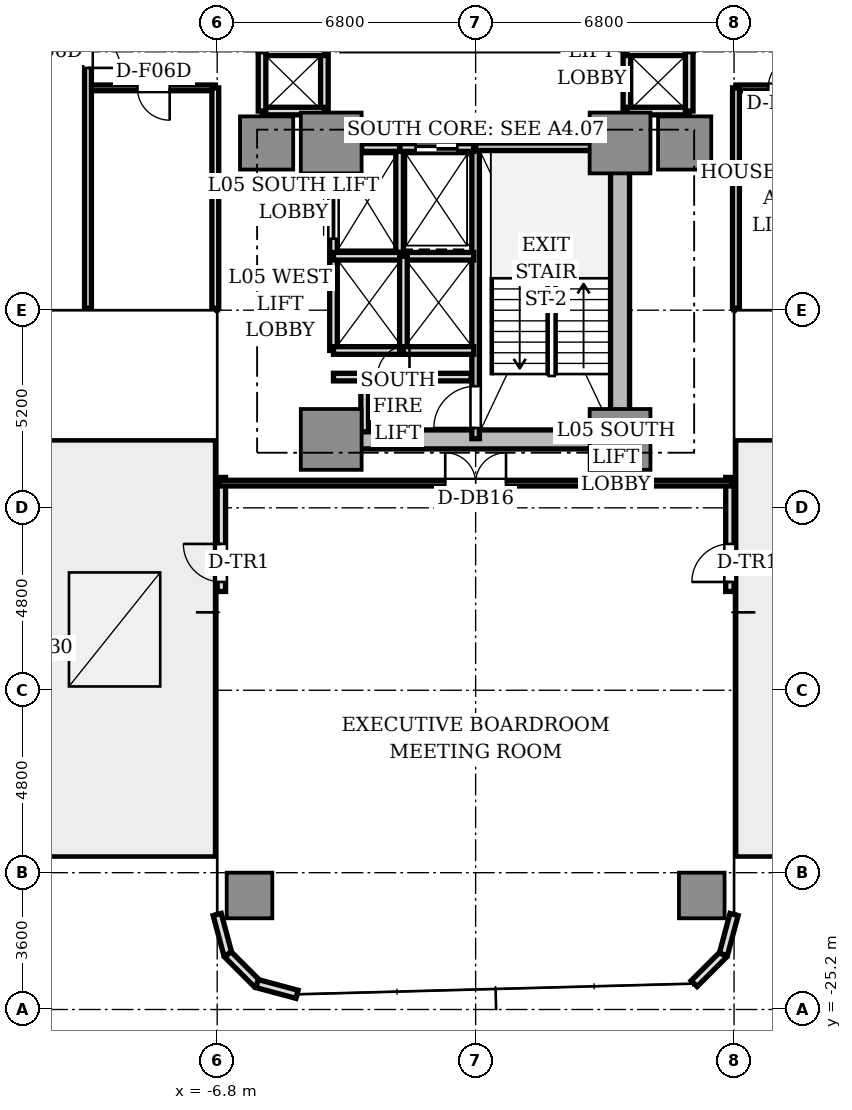
"""IFC4 building model, lengths in metres.
Left out: names, types, materials, properties, quantities, classifications, styles, units other than length and angle.
Written with IfcOpenShell. Run it as: python <this file> out.ifc"""

import sys

from ifc_helpers import new_model, si_unit, direction, frame, frame_2d, origin, origin_2d, place, context, subcontext, project, spatial, rectangle, extrude, source, transform, mapped, element, fill, save


model = new_model("IFC4")
c1 = context("Model", 3, precision=1e-05, world=origin(), true_north=direction((0.0, 1.0)))
c2 = subcontext(c1, "Body", "Model", "MODEL_VIEW")
j1 = project(units=[si_unit("LENGTHUNIT", "METRE"), si_unit("PLANEANGLEUNIT", "RADIAN")], contexts=[c1])
p1 = place(None, origin())
s1 = spatial("IfcSite", under=j1, at=p1, CompositionType="ELEMENT")
p2 = place(p1, origin())
s2 = spatial("IfcBuilding", under=s1, at=p2, CompositionType="ELEMENT")
p3 = place(p2, frame((0.0, 0.0, 23.1)))
s3 = spatial("IfcBuildingStorey", under=s2, at=p3, CompositionType="ELEMENT", Elevation=23.1)
p4 = place(p3, frame((-3.55, -10.2, 0.0), z_axis=(0.0, 0.0, 1.0), x_axis=(1.0, 0.0, 0.0)))
e1 = element("IfcWall", 1, at=p4, inside=s3, PredefinedType="SHEAR", context=c2, shape_type="SweptSolid", body=[
    extrude(rectangle(XDim=7.1, YDim=0.5, at=frame_2d((3.55, 0.0))), origin(), (0.0, 0.0, 1.0), 3.11),
])
p5 = place(p3, frame((3.8, -9.75, 0.0), z_axis=(0.0, 0.0, 1.0), x_axis=(0.0, 1.0, 0.0)))
e2 = element("IfcWall", 2, at=p5, inside=s3, PredefinedType="SHEAR", context=c2, shape_type="SweptSolid", body=[
    extrude(rectangle(XDim=6.9, YDim=0.5, at=frame_2d((3.45, 0.0))), origin(), (0.0, 0.0, 1.0), 3.11),
])
m1 = source(origin(), c2, "Body", "SweptSolid", [
    extrude(rectangle(XDim=1.6, YDim=1.6, at=origin_2d()), origin(), (0.0, 0.0, 1.0), 3.11),
])
for number, where, z_axis, x_axis in (
    (3, (-3.8, -2.4, 0.0), (0.0, 0.0, 1.0), (1.0, 0.0, 0.0)),
    (4, (3.8, -2.4, 0.0), (0.0, 0.0, 1.0), (1.0, 0.0, 0.0)),
    (5, (-3.8, -10.2, 0.0), (0.0, 0.0, 1.0), (1.0, 0.0, 0.0)),
    (6, (3.8, -10.2, 0.0), (0.0, 0.0, 1.0), (1.0, 0.0, 0.0)),
):
    element("IfcColumn", number, at=place(p3, frame(where, z_axis=z_axis, x_axis=x_axis)), inside=s3, PredefinedType="COLUMN", context=c2, shape_type="MappedRepresentation", body=[
        mapped(m1, transform((0.0, 0.0, 0.0), scale=1.0)),
    ])
m2 = source(origin(), c2, "Body", "SweptSolid", [
    extrude(rectangle(XDim=1.4, YDim=1.4, at=origin_2d()), origin(), (0.0, 0.0, 1.0), 3.11),
])
for number, where, z_axis, x_axis in (
    (7, (5.5, -2.4, 0.0), (0.0, 0.0, 1.0), (1.0, 0.0, 0.0)),
    (8, (-5.5, -2.4, 0.0), (0.0, 0.0, 1.0), (1.0, 0.0, 0.0)),
):
    element("IfcColumn", number, at=place(p3, frame(where, z_axis=z_axis, x_axis=x_axis)), inside=s3, PredefinedType="COLUMN", context=c2, shape_type="MappedRepresentation", body=[
        mapped(m2, transform((0.0, 0.0, 0.0), scale=1.0)),
    ])
m3 = source(origin(), c2, "Body", "SweptSolid", [
    extrude(rectangle(XDim=1.2, YDim=1.2, at=origin_2d()), origin(), (0.0, 0.0, 1.0), 3.11),
])
for number, where, z_axis, x_axis in (
    (9, (-5.95, -22.2, 0.0), (0.0, 0.0, 1.0), (1.0, 0.0, 0.0)),
    (10, (5.95, -22.2, 0.0), (0.0, 0.0, 1.0), (1.0, 0.0, 0.0)),
):
    element("IfcColumn", number, at=place(p3, frame(where, z_axis=z_axis, x_axis=x_axis)), inside=s3, PredefinedType="COLUMN", context=c2, shape_type="MappedRepresentation", body=[
        mapped(m3, transform((0.0, 0.0, 0.0), scale=1.0)),
    ])
p6 = place(p3, frame((-6.69, -14.2, 0.0), z_axis=(0.0, 0.0, 1.0), x_axis=(0.0, 1.0, 0.0)))
e11 = element("IfcWall", 11, at=p6, inside=s3, PredefinedType="STANDARD", context=c2, shape_type="SweptSolid", body=[
    extrude(rectangle(XDim=3.0, YDim=0.22, at=frame_2d((1.5, 0.0))), origin(), (0.0, 0.0, 1.0), 3.11),
])
p7 = place(p6, frame((0.25, 0.0, 0.0)))
e12 = element("IfcOpeningElement", 12, at=p7, cuts=e11, PredefinedType="OPENING", context=c2, shape_type="SweptSolid", body=[
    extrude(rectangle(XDim=1.0, YDim=2.2, at=frame_2d((0.5, 1.1))), frame((0.0, 0.12, 0.0), z_axis=(0.0, -1.0, 0.0), x_axis=(1.0, 0.0, 0.0)), (0.0, 0.0, 1.0), 0.24),
])
p8 = place(p3, frame((6.69, -14.2, 0.0), z_axis=(0.0, 0.0, 1.0), x_axis=(0.0, 1.0, 0.0)))
e13 = element("IfcWall", 13, at=p8, inside=s3, PredefinedType="STANDARD", context=c2, shape_type="SweptSolid", body=[
    extrude(rectangle(XDim=3.0, YDim=0.22, at=frame_2d((1.5, 0.0))), origin(), (0.0, 0.0, 1.0), 3.11),
])
p9 = place(p8, frame((0.25, 0.0, 0.0)))
e14 = element("IfcOpeningElement", 14, at=p9, cuts=e13, PredefinedType="OPENING", context=c2, shape_type="SweptSolid", body=[
    extrude(rectangle(XDim=1.0, YDim=2.2, at=frame_2d((0.5, 1.1))), frame((0.0, 0.12, 0.0), z_axis=(0.0, -1.0, 0.0), x_axis=(1.0, 0.0, 0.0)), (0.0, 0.0, 1.0), 0.24),
])
for number, where, z_axis, x_axis in (
    (15, (-6.8, -22.7, 0.0), (0.0, 0.0, 1.0), (0.259, -0.966, 0.0)),
    (16, (-6.519, -23.75, 0.0), (0.0, 0.0, 1.0), (0.707, -0.707, 0.0)),
    (17, (-5.75, -24.519, 0.0), (0.0, 0.0, 1.0), (0.966, -0.259, 0.0)),
    (18, (5.75, -24.519, 0.0), (0.0, 0.0, 1.0), (0.707, 0.707, 0.0)),
    (19, (6.519, -23.75, 0.0), (0.0, 0.0, 1.0), (0.259, 0.966, 0.0)),
):
    element("IfcWall", number, at=place(p3, frame(where, z_axis=z_axis, x_axis=x_axis)), inside=s3, PredefinedType="STANDARD", context=c2, shape_type="SweptSolid", body=[
        extrude(rectangle(XDim=1.087, YDim=0.22, at=frame_2d((0.543, 0.0))), origin(), (0.0, 0.0, 1.0), 3.11),
    ])
p10 = place(p3, frame((0.0, -10.18, 0.0), z_axis=(0.0, 0.0, 1.0), x_axis=(0.0, 1.0, 0.0)))
e20 = element("IfcWall", 20, at=p10, inside=s3, PredefinedType="SOLIDWALL", context=c2, shape_type="SweptSolid", body=[
    extrude(rectangle(XDim=7.68, YDim=0.2, at=frame_2d((3.84, 0.0))), origin(), (0.0, 0.0, 1.0), 3.11),
])
p11 = place(p10, frame((0.28, 0.0, 0.0)))
e21 = element("IfcOpeningElement", 21, at=p11, cuts=e20, PredefinedType="OPENING", context=c2, shape_type="SweptSolid", body=[
    extrude(rectangle(XDim=1.1, YDim=2.15, at=frame_2d((0.55, 1.075))), frame((0.0, 0.11, 0.0), z_axis=(0.0, -1.0, 0.0), x_axis=(1.0, 0.0, 0.0)), (0.0, 0.0, 1.0), 0.22),
])
p12 = place(p3, frame((0.0, -2.5, 0.0), z_axis=(0.0, 0.0, 1.0), x_axis=(1.0, 0.0, 0.0)))
e22 = element("IfcWall", 22, at=p12, inside=s3, PredefinedType="SOLIDWALL", context=c2, shape_type="SweptSolid", body=[
    extrude(rectangle(XDim=3.72, YDim=0.2, at=frame_2d((1.86, 0.0))), origin(), (0.0, 0.0, 1.0), 3.11),
])
p13 = place(p3, frame((-2.0, -5.28, 0.0), z_axis=(0.0, 0.0, 1.0), x_axis=(0.0, 1.0, 0.0)))
e23 = element("IfcWall", 23, at=p13, inside=s3, PredefinedType="SOLIDWALL", context=c2, shape_type="SweptSolid", body=[
    extrude(rectangle(XDim=2.78, YDim=0.2, at=frame_2d((1.39, 0.0))), origin(), (0.0, 0.0, 1.0), 2.66),
])
p14 = place(p3, frame((-2.0, -2.52, 0.0), z_axis=(0.0, 0.0, 1.0), x_axis=(1.0, 0.0, 0.0)))
e24 = element("IfcWall", 24, at=p14, inside=s3, PredefinedType="SOLIDWALL", context=c2, shape_type="SweptSolid", body=[
    extrude(rectangle(XDim=1.95, YDim=0.2, at=frame_2d((0.975, 0.0))), origin(), (0.0, 0.0, 1.0), 2.66),
])
p15 = place(p14, frame((0.42, 0.0, 0.0)))
e25 = element("IfcOpeningElement", 25, at=p15, cuts=e24, PredefinedType="OPENING", context=c2, shape_type="SweptSolid", body=[
    extrude(rectangle(XDim=1.1, YDim=2.2, at=frame_2d((0.55, 1.1))), frame((0.0, 0.11, 0.0), z_axis=(0.0, -1.0, 0.0), x_axis=(1.0, 0.0, 0.0)), (0.0, 0.0, 1.0), 0.22),
])
p16 = place(p3, frame((-3.0, -2.52, 0.0), z_axis=(0.0, 0.0, 1.0), x_axis=(1.0, 0.0, 0.0)))
e26 = element("IfcWall", 26, at=p16, inside=s3, PredefinedType="SOLIDWALL", context=c2, shape_type="SweptSolid", body=[
    extrude(rectangle(XDim=1.0, YDim=0.2, at=frame_2d((0.5, 0.0))), origin(), (0.0, 0.0, 1.0), 2.66),
])
p17 = place(p3, frame((-3.74, -5.36, 0.0), z_axis=(0.0, 0.0, 1.0), x_axis=(0.0, 1.0, 0.0)))
e27 = element("IfcWall", 27, at=p17, inside=s3, PredefinedType="SOLIDWALL", context=c2, shape_type="SweptSolid", body=[
    extrude(rectangle(XDim=2.08, YDim=0.2, at=frame_2d((1.04, 0.0))), origin(), (0.0, 0.0, 1.0), 2.66),
])
p18 = place(p17, frame((0.44, 0.0, 0.0)))
e28 = element("IfcOpeningElement", 28, at=p18, cuts=e27, PredefinedType="OPENING", context=c2, shape_type="SweptSolid", body=[
    extrude(rectangle(XDim=1.2, YDim=2.2, at=frame_2d((0.6, 1.1))), frame((0.0, 0.11, 0.0), z_axis=(0.0, -1.0, 0.0), x_axis=(1.0, 0.0, 0.0)), (0.0, 0.0, 1.0), 0.22),
])
p19 = place(p3, frame((-3.74, -7.86, 0.0), z_axis=(0.0, 0.0, 1.0), x_axis=(0.0, 1.0, 0.0)))
e29 = element("IfcWall", 29, at=p19, inside=s3, PredefinedType="SOLIDWALL", context=c2, shape_type="SweptSolid", body=[
    extrude(rectangle(XDim=2.48, YDim=0.2, at=frame_2d((1.24, 0.0))), origin(), (0.0, 0.0, 1.0), 2.66),
])
p20 = place(p3, frame((-3.74, -7.86, 0.0), z_axis=(0.0, 0.0, 1.0), x_axis=(1.0, 0.0, 0.0)))
e30 = element("IfcWall", 30, at=p20, inside=s3, PredefinedType="SOLIDWALL", context=c2, shape_type="SweptSolid", body=[
    extrude(rectangle(XDim=1.84, YDim=0.2, at=frame_2d((0.92, 0.0))), origin(), (0.0, 0.0, 1.0), 2.66),
])
p21 = place(p3, frame((-3.74, -5.38, 0.0), z_axis=(0.0, 0.0, 1.0), x_axis=(1.0, 0.0, 0.0)))
e31 = element("IfcWall", 31, at=p21, inside=s3, PredefinedType="SOLIDWALL", context=c2, shape_type="SweptSolid", body=[
    extrude(rectangle(XDim=3.69, YDim=0.2, at=frame_2d((1.845, 0.0))), origin(), (0.0, 0.0, 1.0), 2.66),
])
p22 = place(p3, frame((-1.9, -7.86, 0.0), z_axis=(0.0, 0.0, 1.0), x_axis=(0.0, 1.0, 0.0)))
e32 = element("IfcWall", 32, at=p22, inside=s3, PredefinedType="SOLIDWALL", context=c2, shape_type="SweptSolid", body=[
    extrude(rectangle(XDim=2.48, YDim=0.2, at=frame_2d((1.24, 0.0))), origin(), (0.0, 0.0, 1.0), 2.66),
])
p23 = place(p3, frame((-1.9, -7.86, 0.0), z_axis=(0.0, 0.0, 1.0), x_axis=(1.0, 0.0, 0.0)))
e33 = element("IfcWall", 33, at=p23, inside=s3, PredefinedType="SOLIDWALL", context=c2, shape_type="SweptSolid", body=[
    extrude(rectangle(XDim=1.85, YDim=0.2, at=frame_2d((0.925, 0.0))), origin(), (0.0, 0.0, 1.0), 2.66),
])
p24 = place(p3, frame((3.98, -1.56, 0.0), z_axis=(0.0, 0.0, 1.0), x_axis=(0.0, 1.0, 0.0)))
e34 = element("IfcWall", 34, at=p24, inside=s3, PredefinedType="SOLIDWALL", context=c2, shape_type="SweptSolid", body=[
    extrude(rectangle(XDim=3.12, YDim=0.2, at=frame_2d((1.56, 0.0))), origin(), (0.0, 0.0, 1.0), 2.18),
])
for number, where, z_axis, x_axis in (
    (35, (3.98, -1.56, 0.0), (0.0, 0.0, 1.0), (1.0, 0.0, 0.0)),
    (36, (3.98, 0.0, 0.0), (0.0, 0.0, 1.0), (1.0, 0.0, 0.0)),
):
    element("IfcWall", number, at=place(p3, frame(where, z_axis=z_axis, x_axis=x_axis)), inside=s3, PredefinedType="SOLIDWALL", context=c2, shape_type="SweptSolid", body=[
        extrude(rectangle(XDim=1.64, YDim=0.2, at=frame_2d((0.82, 0.0))), origin(), (0.0, 0.0, 1.0), 2.66),
    ])
p25 = place(p3, frame((5.62, -1.56, 0.0), z_axis=(0.0, 0.0, 1.0), x_axis=(0.0, 1.0, 0.0)))
e37 = element("IfcWall", 37, at=p25, inside=s3, PredefinedType="SOLIDWALL", context=c2, shape_type="SweptSolid", body=[
    extrude(rectangle(XDim=1.56, YDim=0.2, at=frame_2d((0.78, 0.0))), origin(), (0.0, 0.0, 1.0), 2.66),
])
p26 = place(p3, frame((-3.98, -1.56, 0.0), z_axis=(0.0, 0.0, 1.0), x_axis=(0.0, 1.0, 0.0)))
e38 = element("IfcWall", 38, at=p26, inside=s3, PredefinedType="SOLIDWALL", context=c2, shape_type="SweptSolid", body=[
    extrude(rectangle(XDim=3.12, YDim=0.2, at=frame_2d((1.56, 0.0))), origin(), (0.0, 0.0, 1.0), 2.18),
])
for number, where, z_axis, x_axis in (
    (39, (-5.62, -1.56, 0.0), (0.0, 0.0, 1.0), (1.0, 0.0, 0.0)),
    (40, (-5.62, 0.0, 0.0), (0.0, 0.0, 1.0), (1.0, 0.0, 0.0)),
):
    element("IfcWall", number, at=place(p3, frame(where, z_axis=z_axis, x_axis=x_axis)), inside=s3, PredefinedType="SOLIDWALL", context=c2, shape_type="SweptSolid", body=[
        extrude(rectangle(XDim=1.64, YDim=0.2, at=frame_2d((0.82, 0.0))), origin(), (0.0, 0.0, 1.0), 2.66),
    ])
p27 = place(p3, frame((-5.62, -1.56, 0.0), z_axis=(0.0, 0.0, 1.0), x_axis=(0.0, 1.0, 0.0)))
e41 = element("IfcWall", 41, at=p27, inside=s3, PredefinedType="SOLIDWALL", context=c2, shape_type="SweptSolid", body=[
    extrude(rectangle(XDim=1.56, YDim=0.2, at=frame_2d((0.78, 0.0))), origin(), (0.0, 0.0, 1.0), 2.66),
])
p28 = place(p3, frame((-3.74, -8.56, 0.0), z_axis=(0.0, 0.0, 1.0), x_axis=(1.0, 0.0, 0.0)))
e42 = element("IfcWall", 42, at=p28, inside=s3, PredefinedType="SOLIDWALL", context=c2, shape_type="SweptSolid", body=[
    extrude(rectangle(XDim=3.62, YDim=0.2, at=frame_2d((1.81, 0.0))), origin(), (0.0, 0.0, 1.0), 2.66),
])
p29 = place(p28, frame((1.15, 0.0, 0.0)))
e43 = element("IfcOpeningElement", 43, at=p29, cuts=e42, PredefinedType="OPENING", context=c2, shape_type="SweptSolid", body=[
    extrude(rectangle(XDim=0.85, YDim=2.1, at=frame_2d((0.425, 1.05))), frame((0.0, 0.11, 0.0), z_axis=(0.0, -1.0, 0.0), x_axis=(1.0, 0.0, 0.0)), (0.0, 0.0, 1.0), 0.22),
])
p30 = place(p3, frame((-2.92, -10.0, 0.0), z_axis=(0.0, 0.0, 1.0), x_axis=(0.0, 1.0, 0.0)))
e44 = element("IfcWall", 44, at=p30, inside=s3, PredefinedType="SOLIDWALL", context=c2, shape_type="SweptSolid", body=[
    extrude(rectangle(XDim=1.44, YDim=0.2, at=frame_2d((0.72, 0.0))), origin(), (0.0, 0.0, 1.0), 2.66),
])
p31 = place(p3, frame((6.85, -0.95, 0.0), z_axis=(0.0, 0.0, 1.0), x_axis=(1.0, 0.0, 0.0)))
e45 = element("IfcWall", 45, at=p31, inside=s3, PredefinedType="PARTITIONING", context=c2, shape_type="SweptSolid", body=[
    extrude(rectangle(XDim=17.9, YDim=0.15, at=frame_2d((8.95, 0.0))), origin(), (0.0, 0.0, 1.0), 2.66),
])
p32 = place(p31, frame((0.85, 0.0, 0.0)))
e46 = element("IfcOpeningElement", 46, at=p32, cuts=e45, PredefinedType="OPENING", context=c2, shape_type="SweptSolid", body=[
    extrude(rectangle(XDim=0.85, YDim=2.1, at=frame_2d((0.425, 1.05))), frame((0.0, 0.085, 0.0), z_axis=(0.0, -1.0, 0.0), x_axis=(1.0, 0.0, 0.0)), (0.0, 0.0, 1.0), 0.17),
])
p33 = place(p31, frame((8.575, 0.0, 0.0)))
e47 = element("IfcOpeningElement", 47, at=p33, cuts=e45, PredefinedType="OPENING", context=c2, shape_type="SweptSolid", body=[
    extrude(rectangle(XDim=0.85, YDim=2.1, at=frame_2d((0.425, 1.05))), frame((0.0, 0.085, 0.0), z_axis=(0.0, -1.0, 0.0), x_axis=(1.0, 0.0, 0.0)), (0.0, 0.0, 1.0), 0.17),
])
p34 = place(p3, frame((6.85, -6.75, 0.0), z_axis=(0.0, 0.0, 1.0), x_axis=(0.0, 1.0, 0.0)))
e48 = element("IfcWall", 48, at=p34, inside=s3, PredefinedType="PARTITIONING", context=c2, shape_type="SweptSolid", body=[
    extrude(rectangle(XDim=5.8, YDim=0.18, at=frame_2d((2.9, 0.0))), origin(), (0.0, 0.0, 1.0), 2.66),
])
p35 = place(p3, frame((-6.85, -0.95, 0.0), z_axis=(0.0, 0.0, 1.0), x_axis=(-1.0, 0.0, 0.0)))
e49 = element("IfcWall", 49, at=p35, inside=s3, PredefinedType="PARTITIONING", context=c2, shape_type="SweptSolid", body=[
    extrude(rectangle(XDim=3.35, YDim=0.15, at=frame_2d((1.675, 0.0))), origin(), (0.0, 0.0, 1.0), 2.66),
])
p36 = place(p35, frame((1.2, 0.0, 0.0)))
e50 = element("IfcOpeningElement", 50, at=p36, cuts=e49, PredefinedType="OPENING", context=c2, shape_type="SweptSolid", body=[
    extrude(rectangle(XDim=0.85, YDim=2.1, at=frame_2d((0.425, 1.05))), frame((0.0, 0.085, 0.0), z_axis=(0.0, -1.0, 0.0), x_axis=(1.0, 0.0, 0.0)), (0.0, 0.0, 1.0), 0.17),
])
p37 = place(p3, frame((-6.85, -0.95, 0.0), z_axis=(0.0, 0.0, 1.0), x_axis=(0.0, -1.0, 0.0)))
e51 = element("IfcWall", 51, at=p37, inside=s3, PredefinedType="PARTITIONING", context=c2, shape_type="SweptSolid", body=[
    extrude(rectangle(XDim=5.8, YDim=0.18, at=frame_2d((2.9, 0.0))), origin(), (0.0, 0.0, 1.0), 2.66),
])
p38 = place(p3, frame((-10.2, 6.75, 0.0), z_axis=(0.0, 0.0, 1.0), x_axis=(0.0, -1.0, 0.0)))
e52 = element("IfcWall", 52, at=p38, inside=s3, PredefinedType="PARTITIONING", context=c2, shape_type="SweptSolid", body=[
    extrude(rectangle(XDim=13.5, YDim=0.18, at=frame_2d((6.75, 0.0))), origin(), (0.0, 0.0, 1.0), 2.66),
])
p39 = place(p38, frame((6.325, 0.0, 0.0)))
e53 = element("IfcOpeningElement", 53, at=p39, cuts=e52, PredefinedType="OPENING", context=c2, shape_type="SweptSolid", body=[
    extrude(rectangle(XDim=0.85, YDim=2.1, at=frame_2d((0.425, 1.05))), frame((0.0, 0.1, 0.0), z_axis=(0.0, -1.0, 0.0), x_axis=(1.0, 0.0, 0.0)), (0.0, 0.0, 1.0), 0.2),
])
p40 = place(p3, frame((-6.75, -11.35, 0.0), z_axis=(0.0, 0.0, 1.0), x_axis=(1.0, 0.0, 0.0)))
e54 = element("IfcWall", 54, at=p40, inside=s3, PredefinedType="PARTITIONING", context=c2, shape_type="SweptSolid", body=[
    extrude(rectangle(XDim=13.5, YDim=0.15, at=frame_2d((6.75, 0.0))), origin(), (0.0, 0.0, 1.0), 2.66),
])
p41 = place(p40, frame((5.95, 0.0, 0.0)))
e55 = element("IfcOpeningElement", 55, at=p41, cuts=e54, PredefinedType="OPENING", context=c2, shape_type="SweptSolid", body=[
    extrude(rectangle(XDim=1.6, YDim=2.25, at=frame_2d((0.8, 1.125))), frame((0.0, 0.085, 0.0), z_axis=(0.0, -1.0, 0.0), x_axis=(1.0, 0.0, 0.0)), (0.0, 0.0, 1.0), 0.17),
])
m4 = source(origin(), c2, "Body", "SweptSolid", [
    extrude(rectangle(XDim=2.4, YDim=3.0, at=origin_2d()), origin(), (0.0, 0.0, 1.0), 0.05),
])
p42 = place(p3, frame((0.0, 0.0, -0.3)))
p43 = place(p42, frame((-9.5, -15.2, 0.25)))
e56 = element("IfcWindow", 56, at=p43, inside=s3, PartitioningType="SINGLE_PANEL", PredefinedType="SKYLIGHT", context=c2, shape_type="MappedRepresentation", body=[
    mapped(m4, transform((0.0, 0.0, 0.0), scale=1.0)),
])
m5 = source(origin(), c2, "Body", "SweptSolid", [
    extrude(rectangle(XDim=1.0, YDim=0.05, at=origin_2d()), origin(), (0.0, 0.0, 1.0), 2.2),
])
p44 = place(p7, frame((0.5, 0.0, 0.0)))
e57 = element("IfcDoor", 57, at=p44, inside=s3, OperationType="SINGLE_SWING_RIGHT", PredefinedType="DOOR", context=c2, shape_type="MappedRepresentation", body=[
    mapped(m5, transform((0.0, 0.0, 0.0), scale=1.0)),
])
fill(e12, e57)
p45 = place(p9, frame((0.5, 0.0, 0.0)))
e58 = element("IfcDoor", 58, at=p45, inside=s3, OperationType="SINGLE_SWING_LEFT", PredefinedType="DOOR", context=c2, shape_type="MappedRepresentation", body=[
    mapped(m5, transform((0.0, 0.0, 0.0), scale=1.0)),
])
fill(e14, e58)
m6 = source(origin(), c2, "Body", "SweptSolid", [
    extrude(rectangle(XDim=1.1, YDim=0.05, at=origin_2d()), origin(), (0.0, 0.0, 1.0), 2.2),
])
p46 = place(p15, frame((0.55, 0.0, 0.0)))
e59 = element("IfcDoor", 59, at=p46, inside=s3, OperationType="DOUBLE_DOOR_SLIDING", PredefinedType="DOOR", context=c2, shape_type="MappedRepresentation", body=[
    mapped(m6, transform((0.0, 0.0, 0.0), scale=1.0)),
])
fill(e25, e59)
m7 = source(origin(), c2, "Body", "SweptSolid", [
    extrude(rectangle(XDim=1.2, YDim=0.05, at=origin_2d()), origin(), (0.0, 0.0, 1.0), 2.2),
])
p47 = place(p18, frame((0.6, 0.0, 0.0)))
e60 = element("IfcDoor", 60, at=p47, inside=s3, OperationType="DOUBLE_DOOR_SLIDING", PredefinedType="DOOR", context=c2, shape_type="MappedRepresentation", body=[
    mapped(m7, transform((0.0, 0.0, 0.0), scale=1.0)),
])
fill(e28, e60)
m8 = source(origin(), c2, "Body", "SweptSolid", [
    extrude(rectangle(XDim=1.1, YDim=0.05, at=origin_2d()), origin(), (0.0, 0.0, 1.0), 2.15),
])
p48 = place(p11, frame((0.55, 0.0, 0.0)))
e61 = element("IfcDoor", 61, at=p48, inside=s3, OperationType="SINGLE_SWING_LEFT", PredefinedType="DOOR", context=c2, shape_type="MappedRepresentation", body=[
    mapped(m8, transform((0.0, 0.0, 0.0), scale=1.0)),
])
fill(e21, e61)
m9 = source(origin(), c2, "Body", "SweptSolid", [
    extrude(rectangle(XDim=0.85, YDim=0.05, at=origin_2d()), origin(), (0.0, 0.0, 1.0), 2.1),
])
p49 = place(p29, frame((0.425, 0.0, 0.0)))
e62 = element("IfcDoor", 62, at=p49, inside=s3, OperationType="SINGLE_SWING_RIGHT", PredefinedType="DOOR", context=c2, shape_type="MappedRepresentation", body=[
    mapped(m9, transform((0.0, 0.0, 0.0), scale=1.0)),
])
fill(e43, e62)
p50 = place(p32, frame((0.425, 0.0, 0.0)))
e63 = element("IfcDoor", 63, at=p50, inside=s3, OperationType="SINGLE_SWING_RIGHT", PredefinedType="DOOR", context=c2, shape_type="MappedRepresentation", body=[
    mapped(m9, transform((0.0, 0.0, 0.0), scale=1.0)),
])
fill(e46, e63)
p51 = place(p36, frame((0.425, 0.0, 0.0)))
e64 = element("IfcDoor", 64, at=p51, inside=s3, OperationType="SINGLE_SWING_LEFT", PredefinedType="DOOR", context=c2, shape_type="MappedRepresentation", body=[
    mapped(m9, transform((0.0, 0.0, 0.0), scale=1.0)),
])
fill(e50, e64)
p52 = place(p39, frame((0.425, 0.0, 0.0)))
e65 = element("IfcDoor", 65, at=p52, inside=s3, OperationType="SINGLE_SWING_RIGHT", PredefinedType="DOOR", context=c2, shape_type="MappedRepresentation", body=[
    mapped(m9, transform((0.0, 0.0, 0.0), scale=1.0)),
])
fill(e53, e65)
m10 = source(origin(), c2, "Body", "SweptSolid", [
    extrude(rectangle(XDim=1.6, YDim=0.05, at=origin_2d()), origin(), (0.0, 0.0, 1.0), 2.25),
])
p53 = place(p41, frame((0.8, 0.0, 0.0)))
e66 = element("IfcDoor", 66, at=p53, inside=s3, OperationType="DOUBLE_DOOR_SINGLE_SWING", PredefinedType="DOOR", context=c2, shape_type="MappedRepresentation", body=[
    mapped(m10, transform((0.0, 0.0, 0.0), scale=1.0)),
])
fill(e55, e66)
save(model, sys.argv[1])
